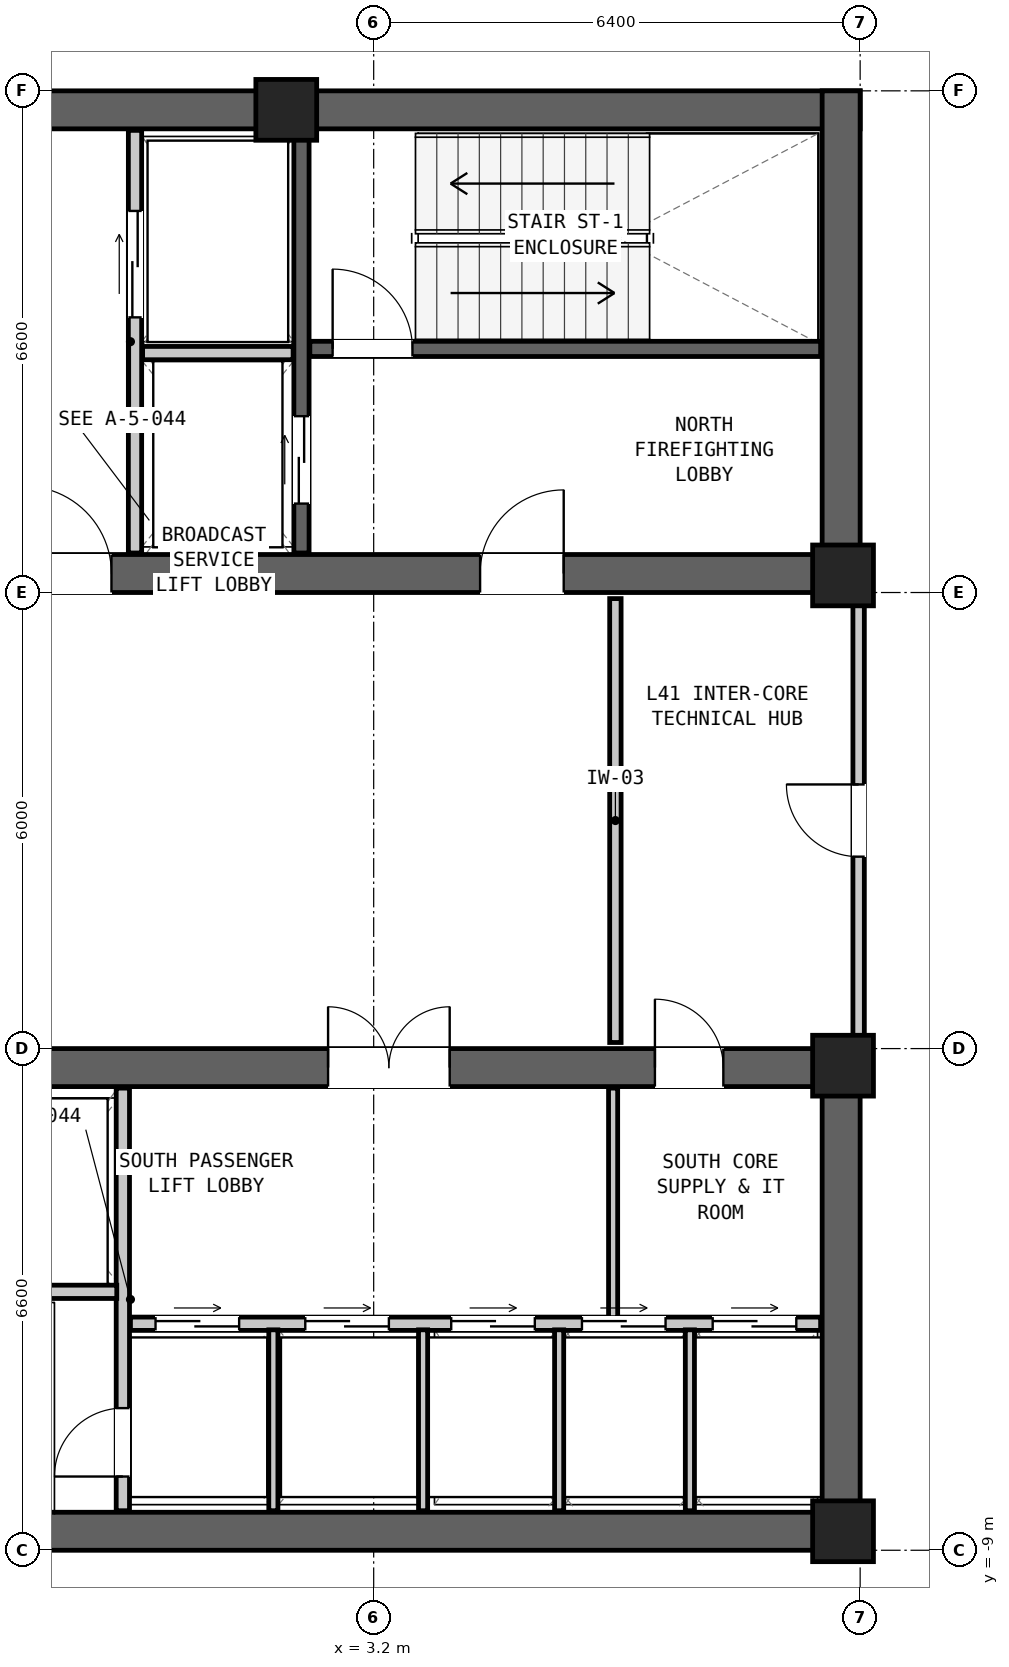
"""IFC4 building model, lengths in metres.
Left out: names, types, materials, properties, quantities, classifications, styles, units other than length and angle.
Written with IfcOpenShell. Run it as: python <this file> out.ifc"""

import sys

from ifc_helpers import new_model, si_unit, direction, frame, frame_2d, origin, origin_2d, place, context, subcontext, project, spatial, rectangle, extrude, element, fill, save


model = new_model("IFC4")
c1 = context("Model", 3, precision=1e-05, world=origin(), true_north=direction((0.0, 1.0)))
c2 = subcontext(c1, "Body", "Model", "MODEL_VIEW")
j1 = project(units=[si_unit("LENGTHUNIT", "METRE"), si_unit("PLANEANGLEUNIT", "RADIAN")], contexts=[c1])
p1 = place(None, origin())
s1 = spatial("IfcSite", under=j1, at=p1, CompositionType="ELEMENT")
p2 = place(p1, origin())
s2 = spatial("IfcBuilding", under=s1, at=p2, CompositionType="ELEMENT")
p3 = place(p2, frame((0.0, 0.0, 140.25)))
s3 = spatial("IfcBuildingStorey", under=s2, at=p3, CompositionType="ELEMENT", Elevation=140.25)
p4 = place(p3, frame((-9.6, 9.95, 0.0), z_axis=(0.0, 0.0, 1.0), x_axis=(1.0, 0.0, 0.0)))
e1 = element("IfcWall", 1, at=p4, inside=s3, PredefinedType="SHEAR", context=c2, shape_type="SweptSolid", body=[
    extrude(rectangle(XDim=19.2, YDim=0.5, at=frame_2d((9.6, 0.0))), origin(), (0.0, 0.0, 1.0), 4.35),
])
p5 = place(p3, frame((-9.6, 3.85, 0.0), z_axis=(0.0, 0.0, 1.0), x_axis=(1.0, 0.0, 0.0)))
e2 = element("IfcWall", 2, at=p5, inside=s3, PredefinedType="SHEAR", context=c2, shape_type="SweptSolid", body=[
    extrude(rectangle(XDim=19.2, YDim=0.5, at=frame_2d((9.6, 0.0))), origin(), (0.0, 0.0, 1.0), 4.35),
])
p6 = place(p5, frame((14.2, 0.0, 0.0)))
e3 = element("IfcOpeningElement", 3, at=p6, cuts=e2, PredefinedType="OPENING", context=c2, shape_type="SweptSolid", body=[
    extrude(rectangle(XDim=1.1, YDim=2.08, at=frame_2d((0.55, 1.04))), frame((0.0, 0.262, 0.0), z_axis=(0.0, -1.0, 0.0), x_axis=(1.0, 0.0, 0.0)), (0.0, 0.0, 1.0), 0.524),
])
p7 = place(p5, frame((8.2, 0.0, 0.0)))
e4 = element("IfcOpeningElement", 4, at=p7, cuts=e2, PredefinedType="OPENING", context=c2, shape_type="SweptSolid", body=[
    extrude(rectangle(XDim=1.15, YDim=2.1, at=frame_2d((0.575, 1.05))), frame((0.0, 0.262, 0.0), z_axis=(0.0, -1.0, 0.0), x_axis=(1.0, 0.0, 0.0)), (0.0, 0.0, 1.0), 0.524),
])
p8 = place(p5, frame((2.5, 0.0, 0.0)))
e5 = element("IfcOpeningElement", 5, at=p8, cuts=e2, PredefinedType="OPENING", context=c2, shape_type="SweptSolid", body=[
    extrude(rectangle(XDim=1.6, YDim=2.12, at=frame_2d((0.8, 1.06))), frame((0.0, 0.262, 0.0), z_axis=(0.0, -1.0, 0.0), x_axis=(1.0, 0.0, 0.0)), (0.0, 0.0, 1.0), 0.524),
])
p9 = place(p3, frame((9.35, 3.6, 0.0), z_axis=(0.0, 0.0, 1.0), x_axis=(0.0, 1.0, 0.0)))
e6 = element("IfcWall", 6, at=p9, inside=s3, PredefinedType="SHEAR", context=c2, shape_type="SweptSolid", body=[
    extrude(rectangle(XDim=6.6, YDim=0.5, at=frame_2d((3.3, 0.0))), origin(), (0.0, 0.0, 1.0), 4.35),
])
p10 = place(p3, frame((-9.6, -8.75, 0.0), z_axis=(0.0, 0.0, 1.0), x_axis=(1.0, 0.0, 0.0)))
e7 = element("IfcWall", 7, at=p10, inside=s3, PredefinedType="SHEAR", context=c2, shape_type="SweptSolid", body=[
    extrude(rectangle(XDim=19.2, YDim=0.5, at=frame_2d((9.6, 0.0))), origin(), (0.0, 0.0, 1.0), 4.35),
])
p11 = place(p3, frame((-9.6, -2.65, 0.0), z_axis=(0.0, 0.0, 1.0), x_axis=(1.0, 0.0, 0.0)))
e8 = element("IfcWall", 8, at=p11, inside=s3, PredefinedType="SHEAR", context=c2, shape_type="SweptSolid", body=[
    extrude(rectangle(XDim=19.2, YDim=0.5, at=frame_2d((9.6, 0.0))), origin(), (0.0, 0.0, 1.0), 4.35),
])
p12 = place(p11, frame((3.8, 0.0, 0.0)))
e9 = element("IfcOpeningElement", 9, at=p12, cuts=e8, PredefinedType="OPENING", context=c2, shape_type="SweptSolid", body=[
    extrude(rectangle(XDim=1.1, YDim=2.08, at=frame_2d((0.55, 1.04))), frame((0.0, 0.262, 0.0), z_axis=(0.0, -1.0, 0.0), x_axis=(1.0, 0.0, 0.0)), (0.0, 0.0, 1.0), 0.524),
])
p13 = place(p11, frame((12.2, 0.0, 0.0)))
e10 = element("IfcOpeningElement", 10, at=p13, cuts=e8, PredefinedType="OPENING", context=c2, shape_type="SweptSolid", body=[
    extrude(rectangle(XDim=1.6, YDim=2.12, at=frame_2d((0.8, 1.06))), frame((0.0, 0.262, 0.0), z_axis=(0.0, -1.0, 0.0), x_axis=(1.0, 0.0, 0.0)), (0.0, 0.0, 1.0), 0.524),
])
p14 = place(p11, frame((16.5, 0.0, 0.0)))
e11 = element("IfcOpeningElement", 11, at=p14, cuts=e8, PredefinedType="OPENING", context=c2, shape_type="SweptSolid", body=[
    extrude(rectangle(XDim=0.9, YDim=2.05, at=frame_2d((0.45, 1.025))), frame((0.0, 0.262, 0.0), z_axis=(0.0, -1.0, 0.0), x_axis=(1.0, 0.0, 0.0)), (0.0, 0.0, 1.0), 0.524),
])
p15 = place(p3, frame((9.35, -9.0, 0.0), z_axis=(0.0, 0.0, 1.0), x_axis=(0.0, 1.0, 0.0)))
e12 = element("IfcWall", 12, at=p15, inside=s3, PredefinedType="SHEAR", context=c2, shape_type="SweptSolid", body=[
    extrude(rectangle(XDim=6.6, YDim=0.5, at=frame_2d((3.3, 0.0))), origin(), (0.0, 0.0, 1.0), 4.35),
])
for number, where, z_axis, x_axis in (
    (13, (2.05, 9.95, 0.0), (0.0, 0.0, 1.0), (1.0, 0.0, 0.0)),
    (14, (9.375, 3.825, 0.0), (0.0, 0.0, 1.0), (1.0, 0.0, 0.0)),
    (15, (9.375, -2.625, 0.0), (0.0, 0.0, 1.0), (1.0, 0.0, 0.0)),
    (16, (9.375, -8.75, 0.0), (0.0, 0.0, 1.0), (1.0, 0.0, 0.0)),
):
    element("IfcColumn", number, at=place(p3, frame(where, z_axis=z_axis, x_axis=x_axis)), inside=s3, PredefinedType="COLUMN", context=c2, shape_type="SweptSolid", body=[
        extrude(rectangle(XDim=0.8, YDim=0.8, at=origin_2d()), origin(), (0.0, 0.0, 1.0), 4.35),
    ])
p16 = place(p3, frame((2.36, 6.805, 0.0), z_axis=(0.0, 0.0, 1.0), x_axis=(1.0, 0.0, 0.0)))
e17 = element("IfcWall", 17, at=p16, inside=s3, PredefinedType="SHEAR", context=c2, shape_type="SweptSolid", body=[
    extrude(rectangle(XDim=6.72, YDim=0.2, at=frame_2d((3.36, 0.0))), origin(), (0.0, 0.0, 1.0), 4.07),
])
p17 = place(p16, frame((0.3, 0.0, 0.0)))
e18 = element("IfcOpeningElement", 18, at=p17, cuts=e17, PredefinedType="OPENING", context=c2, shape_type="SweptSolid", body=[
    extrude(rectangle(XDim=1.05, YDim=2.08, at=frame_2d((0.525, 1.04))), frame((0.0, 0.112, 0.0), z_axis=(0.0, -1.0, 0.0), x_axis=(1.0, 0.0, 0.0)), (0.0, 0.0, 1.0), 0.224),
])
p18 = place(p3, frame((2.25, 4.12, 0.0), z_axis=(0.0, 0.0, 1.0), x_axis=(0.0, 1.0, 0.0)))
e19 = element("IfcWall", 19, at=p18, inside=s3, PredefinedType="SHEAR", context=c2, shape_type="SweptSolid", body=[
    extrude(rectangle(XDim=5.56, YDim=0.2, at=frame_2d((2.78, 0.0))), origin(), (0.0, 0.0, 1.0), 4.07),
])
p19 = place(p18, frame((0.65, 0.0, 0.0)))
e20 = element("IfcOpeningElement", 20, at=p19, cuts=e19, PredefinedType="OPENING", context=c2, shape_type="SweptSolid", body=[
    extrude(rectangle(XDim=1.15, YDim=2.08, at=frame_2d((0.575, 1.04))), frame((0.0, 0.112, 0.0), z_axis=(0.0, -1.0, 0.0), x_axis=(1.0, 0.0, 0.0)), (0.0, 0.0, 1.0), 0.224),
])
p20 = place(p3, frame((0.06, 4.12, 0.0), z_axis=(0.0, 0.0, 1.0), x_axis=(0.0, 1.0, 0.0)))
e21 = element("IfcWall", 21, at=p20, inside=s3, PredefinedType="PARTITIONING", context=c2, shape_type="SweptSolid", body=[
    extrude(rectangle(XDim=5.56, YDim=0.175, at=frame_2d((2.78, 0.0))), origin(), (0.0, 0.0, 1.0), 4.07),
])
p21 = place(p20, frame((3.1, 0.0, 0.0)))
e22 = element("IfcOpeningElement", 22, at=p21, cuts=e21, PredefinedType="OPENING", context=c2, shape_type="SweptSolid", body=[
    extrude(rectangle(XDim=1.4, YDim=2.12, at=frame_2d((0.7, 1.06))), frame((0.0, 0.1, 0.0), z_axis=(0.0, -1.0, 0.0), x_axis=(1.0, 0.0, 0.0)), (0.0, 0.0, 1.0), 0.199),
])
p22 = place(p3, frame((0.16, 6.75, 0.0), z_axis=(0.0, 0.0, 1.0), x_axis=(1.0, 0.0, 0.0)))
e23 = element("IfcWall", 23, at=p22, inside=s3, PredefinedType="PARTITIONING", context=c2, shape_type="SweptSolid", body=[
    extrude(rectangle(XDim=1.98, YDim=0.175, at=frame_2d((0.99, 0.0))), origin(), (0.0, 0.0, 1.0), 4.07),
])
p23 = place(p3, frame((-0.1, -8.48, 0.0), z_axis=(0.0, 0.0, 1.0), x_axis=(0.0, 1.0, 0.0)))
e24 = element("IfcWall", 24, at=p23, inside=s3, PredefinedType="PARTITIONING", context=c2, shape_type="SweptSolid", body=[
    extrude(rectangle(XDim=5.56, YDim=0.175, at=frame_2d((2.78, 0.0))), origin(), (0.0, 0.0, 1.0), 4.07),
])
p24 = place(p23, frame((0.45, 0.0, 0.0)))
e25 = element("IfcOpeningElement", 25, at=p24, cuts=e24, PredefinedType="OPENING", context=c2, shape_type="SweptSolid", body=[
    extrude(rectangle(XDim=0.9, YDim=2.05, at=frame_2d((0.45, 1.025))), frame((0.0, 0.1, 0.0), z_axis=(0.0, -1.0, 0.0), x_axis=(1.0, 0.0, 0.0)), (0.0, 0.0, 1.0), 0.199),
])
p25 = place(p3, frame((-2.15, -5.6, 0.0), z_axis=(0.0, 0.0, 1.0), x_axis=(1.0, 0.0, 0.0)))
e26 = element("IfcWall", 26, at=p25, inside=s3, PredefinedType="PARTITIONING", context=c2, shape_type="SweptSolid", body=[
    extrude(rectangle(XDim=1.97, YDim=0.175, at=frame_2d((0.985, 0.0))), origin(), (0.0, 0.0, 1.0), 4.07),
])
p26 = place(p3, frame((0.0, -6.02, 0.0), z_axis=(0.0, 0.0, 1.0), x_axis=(1.0, 0.0, 0.0)))
e27 = element("IfcWall", 27, at=p26, inside=s3, PredefinedType="PARTITIONING", context=c2, shape_type="SweptSolid", body=[
    extrude(rectangle(XDim=9.08, YDim=0.175, at=frame_2d((4.54, 0.0))), origin(), (0.0, 0.0, 1.0), 4.07),
])
p27 = place(p26, frame((0.33, 0.0, 0.0)))
e28 = element("IfcOpeningElement", 28, at=p27, cuts=e27, PredefinedType="OPENING", context=c2, shape_type="SweptSolid", body=[
    extrude(rectangle(XDim=1.1, YDim=2.06, at=frame_2d((0.55, 1.03))), frame((0.0, 0.1, 0.0), z_axis=(0.0, -1.0, 0.0), x_axis=(1.0, 0.0, 0.0)), (0.0, 0.0, 1.0), 0.199),
])
p28 = place(p26, frame((2.3, 0.0, 0.0)))
e29 = element("IfcOpeningElement", 29, at=p28, cuts=e27, PredefinedType="OPENING", context=c2, shape_type="SweptSolid", body=[
    extrude(rectangle(XDim=1.1, YDim=2.06, at=frame_2d((0.55, 1.03))), frame((0.0, 0.1, 0.0), z_axis=(0.0, -1.0, 0.0), x_axis=(1.0, 0.0, 0.0)), (0.0, 0.0, 1.0), 0.199),
])
p29 = place(p26, frame((4.22, 0.0, 0.0)))
e30 = element("IfcOpeningElement", 30, at=p29, cuts=e27, PredefinedType="OPENING", context=c2, shape_type="SweptSolid", body=[
    extrude(rectangle(XDim=1.1, YDim=2.06, at=frame_2d((0.55, 1.03))), frame((0.0, 0.1, 0.0), z_axis=(0.0, -1.0, 0.0), x_axis=(1.0, 0.0, 0.0)), (0.0, 0.0, 1.0), 0.199),
])
p30 = place(p26, frame((5.94, 0.0, 0.0)))
e31 = element("IfcOpeningElement", 31, at=p30, cuts=e27, PredefinedType="OPENING", context=c2, shape_type="SweptSolid", body=[
    extrude(rectangle(XDim=1.1, YDim=2.06, at=frame_2d((0.55, 1.03))), frame((0.0, 0.1, 0.0), z_axis=(0.0, -1.0, 0.0), x_axis=(1.0, 0.0, 0.0)), (0.0, 0.0, 1.0), 0.199),
])
p31 = place(p26, frame((7.66, 0.0, 0.0)))
e32 = element("IfcOpeningElement", 32, at=p31, cuts=e27, PredefinedType="OPENING", context=c2, shape_type="SweptSolid", body=[
    extrude(rectangle(XDim=1.1, YDim=2.06, at=frame_2d((0.55, 1.03))), frame((0.0, 0.1, 0.0), z_axis=(0.0, -1.0, 0.0), x_axis=(1.0, 0.0, 0.0)), (0.0, 0.0, 1.0), 0.199),
])
for number, where, z_axis, x_axis in (
    (33, (1.88, -8.48, 0.0), (0.0, 0.0, 1.0), (0.0, 1.0, 0.0)),
    (34, (3.85, -8.48, 0.0), (0.0, 0.0, 1.0), (0.0, 1.0, 0.0)),
    (35, (5.64, -8.48, 0.0), (0.0, 0.0, 1.0), (0.0, 1.0, 0.0)),
    (36, (7.36, -8.48, 0.0), (0.0, 0.0, 1.0), (0.0, 1.0, 0.0)),
):
    element("IfcWall", number, at=place(p3, frame(where, z_axis=z_axis, x_axis=x_axis)), inside=s3, PredefinedType="PARTITIONING", context=c2, shape_type="SweptSolid", body=[
        extrude(rectangle(XDim=2.38, YDim=0.12, at=frame_2d((1.19, 0.0))), origin(), (0.0, 0.0, 1.0), 4.07),
    ])
p32 = place(p3, frame((6.35, -5.94, 0.0), z_axis=(0.0, 0.0, 1.0), x_axis=(0.0, 1.0, 0.0)))
e37 = element("IfcWall", 37, at=p32, inside=s3, PredefinedType="PARTITIONING", context=c2, shape_type="SweptSolid", body=[
    extrude(rectangle(XDim=3.02, YDim=0.12, at=frame_2d((1.51, 0.0))), origin(), (0.0, 0.0, 1.0), 4.07),
])
p33 = place(p3, frame((6.38, -2.32, 0.0), z_axis=(0.0, 0.0, 1.0), x_axis=(0.0, 1.0, 0.0)))
e38 = element("IfcWall", 38, at=p33, inside=s3, PredefinedType="PARTITIONING", context=c2, shape_type="SweptSolid", body=[
    extrude(rectangle(XDim=5.84, YDim=0.15, at=frame_2d((2.92, 0.0))), origin(), (0.0, 0.0, 1.0), 3.438),
])
p34 = place(p3, frame((9.58, -2.32, 0.0), z_axis=(0.0, 0.0, 1.0), x_axis=(0.0, 1.0, 0.0)))
e39 = element("IfcWall", 39, at=p34, inside=s3, PredefinedType="PARTITIONING", context=c2, shape_type="SweptSolid", body=[
    extrude(rectangle(XDim=5.84, YDim=0.15, at=frame_2d((2.92, 0.0))), origin(), (0.0, 0.0, 1.0), 2.25),
])
p35 = place(p34, frame((2.445, 0.0, 0.0)))
e40 = element("IfcOpeningElement", 40, at=p35, cuts=e39, PredefinedType="OPENING", context=c2, shape_type="SweptSolid", body=[
    extrude(rectangle(XDim=0.95, YDim=2.1, at=frame_2d((0.475, 1.05))), frame((0.0, 0.087, 0.0), z_axis=(0.0, -1.0, 0.0), x_axis=(1.0, 0.0, 0.0)), (0.0, 0.0, 1.0), 0.174),
])
p36 = place(p17, origin())
e41 = element("IfcDoor", 41, at=p36, inside=s3, OperationType="SINGLE_SWING_LEFT", PredefinedType="DOOR", context=c2, shape_type="SweptSolid", body=[
    extrude(rectangle(XDim=1.05, YDim=2.08, at=frame_2d((0.525, 1.04))), frame((0.0, 0.025, 0.0), z_axis=(0.0, -1.0, 0.0), x_axis=(1.0, 0.0, 0.0)), (0.0, 0.0, 1.0), 0.05),
])
fill(e18, e41)
p37 = place(p6, origin())
e42 = element("IfcDoor", 42, at=p37, inside=s3, OperationType="SINGLE_SWING_RIGHT", PredefinedType="DOOR", context=c2, shape_type="SweptSolid", body=[
    extrude(rectangle(XDim=1.1, YDim=2.08, at=frame_2d((0.55, 1.04))), frame((0.0, 0.025, 0.0), z_axis=(0.0, -1.0, 0.0), x_axis=(1.0, 0.0, 0.0)), (0.0, 0.0, 1.0), 0.05),
])
fill(e3, e42)
p38 = place(p19, origin())
e43 = element("IfcDoor", 43, at=p38, inside=s3, OperationType="DOUBLE_DOOR_SLIDING", PredefinedType="DOOR", context=c2, shape_type="SweptSolid", body=[
    extrude(rectangle(XDim=1.15, YDim=2.08, at=frame_2d((0.575, 1.04))), frame((0.0, 0.025, 0.0), z_axis=(0.0, -1.0, 0.0), x_axis=(1.0, 0.0, 0.0)), (0.0, 0.0, 1.0), 0.05),
])
fill(e20, e43)
p39 = place(p21, origin())
e44 = element("IfcDoor", 44, at=p39, inside=s3, OperationType="DOUBLE_DOOR_SLIDING", PredefinedType="DOOR", context=c2, shape_type="SweptSolid", body=[
    extrude(rectangle(XDim=1.4, YDim=2.12, at=frame_2d((0.7, 1.06))), frame((0.0, 0.025, 0.0), z_axis=(0.0, -1.0, 0.0), x_axis=(1.0, 0.0, 0.0)), (0.0, 0.0, 1.0), 0.05),
])
fill(e22, e44)
p40 = place(p7, origin())
e45 = element("IfcDoor", 45, at=p40, inside=s3, OperationType="SINGLE_SWING_LEFT", PredefinedType="DOOR", context=c2, shape_type="SweptSolid", body=[
    extrude(rectangle(XDim=1.15, YDim=2.1, at=frame_2d((0.575, 1.05))), frame((0.0, 0.025, 0.0), z_axis=(0.0, -1.0, 0.0), x_axis=(1.0, 0.0, 0.0)), (0.0, 0.0, 1.0), 0.05),
])
fill(e4, e45)
p41 = place(p24, origin())
e46 = element("IfcDoor", 46, at=p41, inside=s3, OperationType="SINGLE_SWING_LEFT", PredefinedType="DOOR", context=c2, shape_type="SweptSolid", body=[
    extrude(rectangle(XDim=0.9, YDim=2.05, at=frame_2d((0.45, 1.025))), frame((0.0, 0.025, 0.0), z_axis=(0.0, -1.0, 0.0), x_axis=(1.0, 0.0, 0.0)), (0.0, 0.0, 1.0), 0.05),
])
fill(e25, e46)
p42 = place(p27, origin())
e47 = element("IfcDoor", 47, at=p42, inside=s3, OperationType="DOUBLE_DOOR_SLIDING", PredefinedType="DOOR", context=c2, shape_type="SweptSolid", body=[
    extrude(rectangle(XDim=1.1, YDim=2.06, at=frame_2d((0.55, 1.03))), frame((0.0, 0.025, 0.0), z_axis=(0.0, -1.0, 0.0), x_axis=(1.0, 0.0, 0.0)), (0.0, 0.0, 1.0), 0.05),
])
fill(e28, e47)
p43 = place(p28, origin())
e48 = element("IfcDoor", 48, at=p43, inside=s3, OperationType="DOUBLE_DOOR_SLIDING", PredefinedType="DOOR", context=c2, shape_type="SweptSolid", body=[
    extrude(rectangle(XDim=1.1, YDim=2.06, at=frame_2d((0.55, 1.03))), frame((0.0, 0.025, 0.0), z_axis=(0.0, -1.0, 0.0), x_axis=(1.0, 0.0, 0.0)), (0.0, 0.0, 1.0), 0.05),
])
fill(e29, e48)
p44 = place(p13, origin())
e49 = element("IfcDoor", 49, at=p44, inside=s3, OperationType="DOUBLE_DOOR_SINGLE_SWING", PredefinedType="DOOR", context=c2, shape_type="SweptSolid", body=[
    extrude(rectangle(XDim=1.6, YDim=2.12, at=frame_2d((0.8, 1.06))), frame((0.0, 0.025, 0.0), z_axis=(0.0, -1.0, 0.0), x_axis=(1.0, 0.0, 0.0)), (0.0, 0.0, 1.0), 0.05),
])
fill(e10, e49)
p45 = place(p14, origin())
e50 = element("IfcDoor", 50, at=p45, inside=s3, OperationType="SINGLE_SWING_LEFT", PredefinedType="DOOR", context=c2, shape_type="SweptSolid", body=[
    extrude(rectangle(XDim=0.9, YDim=2.05, at=frame_2d((0.45, 1.025))), frame((0.0, 0.025, 0.0), z_axis=(0.0, -1.0, 0.0), x_axis=(1.0, 0.0, 0.0)), (0.0, 0.0, 1.0), 0.05),
])
fill(e11, e50)
p46 = place(p35, origin())
e51 = element("IfcDoor", 51, at=p46, inside=s3, OperationType="SINGLE_SWING_RIGHT", PredefinedType="DOOR", context=c2, shape_type="SweptSolid", body=[
    extrude(rectangle(XDim=0.95, YDim=2.1, at=frame_2d((0.475, 1.05))), frame((0.0, 0.025, 0.0), z_axis=(0.0, -1.0, 0.0), x_axis=(1.0, 0.0, 0.0)), (0.0, 0.0, 1.0), 0.05),
])
fill(e40, e51)
p47 = place(p29, origin())
e52 = element("IfcDoor", 52, at=p47, inside=s3, OperationType="DOUBLE_DOOR_SLIDING", PredefinedType="DOOR", context=c2, shape_type="SweptSolid", body=[
    extrude(rectangle(XDim=1.1, YDim=2.06, at=frame_2d((0.55, 1.03))), frame((0.0, 0.025, 0.0), z_axis=(0.0, -1.0, 0.0), x_axis=(1.0, 0.0, 0.0)), (0.0, 0.0, 1.0), 0.05),
])
fill(e30, e52)
p48 = place(p30, origin())
e53 = element("IfcDoor", 53, at=p48, inside=s3, OperationType="DOUBLE_DOOR_SLIDING", PredefinedType="DOOR", context=c2, shape_type="SweptSolid", body=[
    extrude(rectangle(XDim=1.1, YDim=2.06, at=frame_2d((0.55, 1.03))), frame((0.0, 0.025, 0.0), z_axis=(0.0, -1.0, 0.0), x_axis=(1.0, 0.0, 0.0)), (0.0, 0.0, 1.0), 0.05),
])
fill(e31, e53)
p49 = place(p31, origin())
e54 = element("IfcDoor", 54, at=p49, inside=s3, OperationType="DOUBLE_DOOR_SLIDING", PredefinedType="DOOR", context=c2, shape_type="SweptSolid", body=[
    extrude(rectangle(XDim=1.1, YDim=2.06, at=frame_2d((0.55, 1.03))), frame((0.0, 0.025, 0.0), z_axis=(0.0, -1.0, 0.0), x_axis=(1.0, 0.0, 0.0)), (0.0, 0.0, 1.0), 0.05),
])
fill(e32, e54)
save(model, sys.argv[1])
